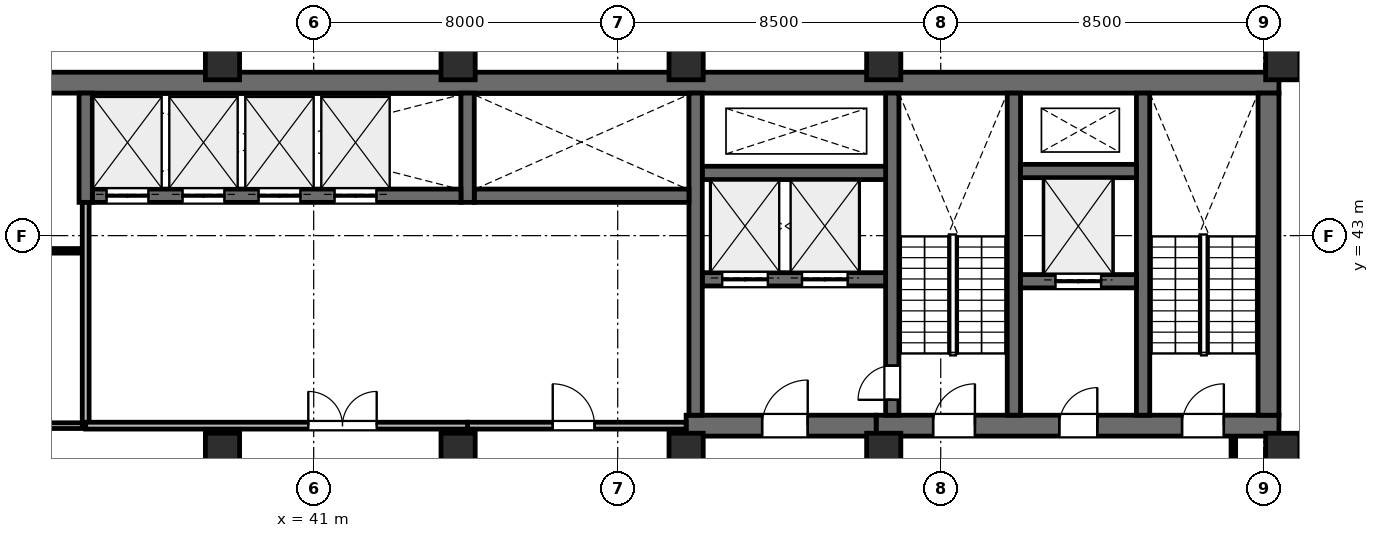
"""IFC4 building model, lengths in metres.
Left out: names, types, materials, properties, quantities, classifications, styles, units other than length and angle.
Written with IfcOpenShell. Run it as: python <this file> out.ifc"""

import sys

from ifc_helpers import new_model, si_unit, direction, frame, frame_2d, origin, origin_2d, place, context, subcontext, project, spatial, rectangle, extrude, element, fill, save


model = new_model("IFC4")
c1 = context("Model", 3, precision=1e-05, world=origin(), true_north=direction((0.0, 1.0)))
c2 = subcontext(c1, "Body", "Model", "MODEL_VIEW")
j1 = project(units=[si_unit("LENGTHUNIT", "METRE"), si_unit("PLANEANGLEUNIT", "RADIAN")], contexts=[c1])
p1 = place(None, origin())
s1 = spatial("IfcSite", under=j1, at=p1, CompositionType="ELEMENT")
p2 = place(p1, origin())
s2 = spatial("IfcBuilding", under=s1, at=p2, CompositionType="ELEMENT")
p3 = place(p2, frame((0.0, 0.0, 168.5)))
s3 = spatial("IfcBuildingStorey", under=s2, at=p3, CompositionType="ELEMENT", Elevation=168.5)
p4 = place(p3, frame((22.9, 47.025, 0.0), z_axis=(0.0, 0.0, 1.0), x_axis=(1.0, 0.0, 0.0)))
e1 = element("IfcWall", 1, at=p4, inside=s3, PredefinedType="SHEAR", context=c2, shape_type="SweptSolid", body=[
    extrude(rectangle(XDim=43.5, YDim=0.55, at=frame_2d((21.75, 0.0))), origin(), (0.0, 0.0, 1.0), 4.0),
])
p5 = place(p3, frame((55.8, 38.0, 0.0), z_axis=(0.0, 0.0, 1.0), x_axis=(1.0, 0.0, 0.0)))
e2 = element("IfcWall", 2, at=p5, inside=s3, PredefinedType="SHEAR", context=c2, shape_type="SweptSolid", body=[
    extrude(rectangle(XDim=10.6, YDim=0.55, at=frame_2d((5.3, 0.0))), origin(), (0.0, 0.0, 1.0), 4.0),
])
p6 = place(p5, frame((1.5, 0.0, 0.0)))
e3 = element("IfcOpeningElement", 3, at=p6, cuts=e2, PredefinedType="OPENING", context=c2, shape_type="SweptSolid", body=[
    extrude(rectangle(XDim=1.1, YDim=2.2, at=frame_2d((0.55, 1.1))), frame((0.0, 0.285, 0.0), z_axis=(0.0, -1.0, 0.0), x_axis=(1.0, 0.0, 0.0)), (0.0, 0.0, 1.0), 0.57),
])
p7 = place(p5, frame((4.82, 0.0, 0.0)))
e4 = element("IfcOpeningElement", 4, at=p7, cuts=e2, PredefinedType="OPENING", context=c2, shape_type="SweptSolid", body=[
    extrude(rectangle(XDim=1.0, YDim=2.15, at=frame_2d((0.5, 1.075))), frame((0.0, 0.285, 0.0), z_axis=(0.0, -1.0, 0.0), x_axis=(1.0, 0.0, 0.0)), (0.0, 0.0, 1.0), 0.57),
])
p8 = place(p5, frame((8.05, 0.0, 0.0)))
e5 = element("IfcOpeningElement", 5, at=p8, cuts=e2, PredefinedType="OPENING", context=c2, shape_type="SweptSolid", body=[
    extrude(rectangle(XDim=1.1, YDim=2.2, at=frame_2d((0.55, 1.1))), frame((0.0, 0.285, 0.0), z_axis=(0.0, -1.0, 0.0), x_axis=(1.0, 0.0, 0.0)), (0.0, 0.0, 1.0), 0.57),
])
p9 = place(p3, frame((66.125, 38.275, 0.0), z_axis=(0.0, 0.0, 1.0), x_axis=(0.0, 1.0, 0.0)))
e6 = element("IfcWall", 6, at=p9, inside=s3, PredefinedType="SHEAR", context=c2, shape_type="SweptSolid", body=[
    extrude(rectangle(XDim=8.475, YDim=0.55, at=frame_2d((4.238, 0.0))), origin(), (0.0, 0.0, 1.0), 4.0),
])
for number, where, z_axis, x_axis in (
    (7, (62.825, 38.275, 0.0), (0.0, 0.0, 1.0), (0.0, 1.0, 0.0)),
    (8, (59.425, 38.275, 0.0), (0.0, 0.0, 1.0), (0.0, 1.0, 0.0)),
):
    element("IfcWall", number, at=place(p3, frame(where, z_axis=z_axis, x_axis=x_axis)), inside=s3, PredefinedType="SHEAR", context=c2, shape_type="SweptSolid", body=[
        extrude(rectangle(XDim=8.475, YDim=0.35, at=frame_2d((4.238, 0.0))), origin(), (0.0, 0.0, 1.0), 4.0),
    ])
p10 = place(p3, frame((56.225, 38.275, 0.0), z_axis=(0.0, 0.0, 1.0), x_axis=(0.0, 1.0, 0.0)))
e9 = element("IfcWall", 9, at=p10, inside=s3, PredefinedType="SHEAR", context=c2, shape_type="SweptSolid", body=[
    extrude(rectangle(XDim=8.475, YDim=0.35, at=frame_2d((4.238, 0.0))), origin(), (0.0, 0.0, 1.0), 4.0),
])
p11 = place(p10, frame((0.405, 0.0, 0.0)))
e10 = element("IfcOpeningElement", 10, at=p11, cuts=e9, PredefinedType="OPENING", context=c2, shape_type="SweptSolid", body=[
    extrude(rectangle(XDim=0.9, YDim=2.15, at=frame_2d((0.45, 1.075))), frame((0.0, 0.185, 0.0), z_axis=(0.0, -1.0, 0.0), x_axis=(1.0, 0.0, 0.0)), (0.0, 0.0, 1.0), 0.37),
])
p12 = place(p3, frame((59.6, 41.8, 0.0), z_axis=(0.0, 0.0, 1.0), x_axis=(1.0, 0.0, 0.0)))
e11 = element("IfcWall", 11, at=p12, inside=s3, PredefinedType="SHEAR", context=c2, shape_type="SweptSolid", body=[
    extrude(rectangle(XDim=3.05, YDim=0.35, at=frame_2d((1.525, 0.0))), origin(), (0.0, 0.0, 1.0), 4.0),
])
p13 = place(p12, frame((0.92, 0.0, 0.0)))
e12 = element("IfcOpeningElement", 12, at=p13, cuts=e11, PredefinedType="OPENING", context=c2, shape_type="SweptSolid", body=[
    extrude(rectangle(XDim=1.2, YDim=2.2, at=frame_2d((0.6, 1.1))), frame((0.0, 0.185, 0.0), z_axis=(0.0, -1.0, 0.0), x_axis=(1.0, 0.0, 0.0)), (0.0, 0.0, 1.0), 0.37),
])
p14 = place(p3, frame((59.6, 44.7, 0.0), z_axis=(0.0, 0.0, 1.0), x_axis=(1.0, 0.0, 0.0)))
e13 = element("IfcWall", 13, at=p14, inside=s3, PredefinedType="SHEAR", context=c2, shape_type="SweptSolid", body=[
    extrude(rectangle(XDim=3.05, YDim=0.35, at=frame_2d((1.525, 0.0))), origin(), (0.0, 0.0, 1.0), 4.0),
])
p15 = place(p3, frame((50.8, 38.0, 0.0), z_axis=(0.0, 0.0, 1.0), x_axis=(1.0, 0.0, 0.0)))
e14 = element("IfcWall", 14, at=p15, inside=s3, PredefinedType="SHEAR", context=c2, shape_type="SweptSolid", body=[
    extrude(rectangle(XDim=5.0, YDim=0.55, at=frame_2d((2.5, 0.0))), origin(), (0.0, 0.0, 1.0), 4.0),
])
p16 = place(p15, frame((2.0, 0.0, 0.0)))
e15 = element("IfcOpeningElement", 15, at=p16, cuts=e14, PredefinedType="OPENING", context=c2, shape_type="SweptSolid", body=[
    extrude(rectangle(XDim=1.2, YDim=2.2, at=frame_2d((0.6, 1.1))), frame((0.0, 0.285, 0.0), z_axis=(0.0, -1.0, 0.0), x_axis=(1.0, 0.0, 0.0)), (0.0, 0.0, 1.0), 0.57),
])
p17 = place(p3, frame((51.225, 41.85, 0.0), z_axis=(0.0, 0.0, 1.0), x_axis=(1.0, 0.0, 0.0)))
e16 = element("IfcWall", 16, at=p17, inside=s3, PredefinedType="SHEAR", context=c2, shape_type="SweptSolid", body=[
    extrude(rectangle(XDim=4.825, YDim=0.35, at=frame_2d((2.413, 0.0))), origin(), (0.0, 0.0, 1.0), 4.0),
])
p18 = place(p17, frame((0.525, 0.0, 0.0)))
e17 = element("IfcOpeningElement", 17, at=p18, cuts=e16, PredefinedType="OPENING", context=c2, shape_type="SweptSolid", body=[
    extrude(rectangle(XDim=1.2, YDim=2.2, at=frame_2d((0.6, 1.1))), frame((0.0, 0.185, 0.0), z_axis=(0.0, -1.0, 0.0), x_axis=(1.0, 0.0, 0.0)), (0.0, 0.0, 1.0), 0.37),
])
p19 = place(p17, frame((2.625, 0.0, 0.0)))
e18 = element("IfcOpeningElement", 18, at=p19, cuts=e16, PredefinedType="OPENING", context=c2, shape_type="SweptSolid", body=[
    extrude(rectangle(XDim=1.2, YDim=2.2, at=frame_2d((0.6, 1.1))), frame((0.0, 0.185, 0.0), z_axis=(0.0, -1.0, 0.0), x_axis=(1.0, 0.0, 0.0)), (0.0, 0.0, 1.0), 0.37),
])
p20 = place(p3, frame((51.225, 44.65, 0.0), z_axis=(0.0, 0.0, 1.0), x_axis=(1.0, 0.0, 0.0)))
e19 = element("IfcWall", 19, at=p20, inside=s3, PredefinedType="SHEAR", context=c2, shape_type="SweptSolid", body=[
    extrude(rectangle(XDim=4.825, YDim=0.35, at=frame_2d((2.413, 0.0))), origin(), (0.0, 0.0, 1.0), 4.0),
])
p21 = place(p3, frame((51.05, 38.275, 0.0), z_axis=(0.0, 0.0, 1.0), x_axis=(0.0, 1.0, 0.0)))
e20 = element("IfcWall", 20, at=p21, inside=s3, PredefinedType="SHEAR", context=c2, shape_type="SweptSolid", body=[
    extrude(rectangle(XDim=8.475, YDim=0.35, at=frame_2d((4.238, 0.0))), origin(), (0.0, 0.0, 1.0), 4.0),
])
p22 = place(p3, frame((45.225, 44.05, 0.0), z_axis=(0.0, 0.0, 1.0), x_axis=(1.0, 0.0, 0.0)))
e21 = element("IfcWall", 21, at=p22, inside=s3, PredefinedType="SHEAR", context=c2, shape_type="SweptSolid", body=[
    extrude(rectangle(XDim=5.65, YDim=0.35, at=frame_2d((2.825, 0.0))), origin(), (0.0, 0.0, 1.0), 4.0),
])
p23 = place(p3, frame((45.05, 43.875, 0.0), z_axis=(0.0, 0.0, 1.0), x_axis=(0.0, 1.0, 0.0)))
e22 = element("IfcWall", 22, at=p23, inside=s3, PredefinedType="SHEAR", context=c2, shape_type="SweptSolid", body=[
    extrude(rectangle(XDim=2.875, YDim=0.35, at=frame_2d((1.438, 0.0))), origin(), (0.0, 0.0, 1.0), 4.0),
])
p24 = place(p3, frame((35.175, 44.05, 0.0), z_axis=(0.0, 0.0, 1.0), x_axis=(1.0, 0.0, 0.0)))
e23 = element("IfcWall", 23, at=p24, inside=s3, PredefinedType="SHEAR", context=c2, shape_type="SweptSolid", body=[
    extrude(rectangle(XDim=9.7, YDim=0.35, at=frame_2d((4.85, 0.0))), origin(), (0.0, 0.0, 1.0), 4.0),
])
p25 = place(p24, frame((0.375, 0.0, 0.0)))
e24 = element("IfcOpeningElement", 24, at=p25, cuts=e23, PredefinedType="OPENING", context=c2, shape_type="SweptSolid", body=[
    extrude(rectangle(XDim=1.1, YDim=2.2, at=frame_2d((0.55, 1.1))), frame((0.0, 0.185, 0.0), z_axis=(0.0, -1.0, 0.0), x_axis=(1.0, 0.0, 0.0)), (0.0, 0.0, 1.0), 0.37),
])
p26 = place(p24, frame((2.375, 0.0, 0.0)))
e25 = element("IfcOpeningElement", 25, at=p26, cuts=e23, PredefinedType="OPENING", context=c2, shape_type="SweptSolid", body=[
    extrude(rectangle(XDim=1.1, YDim=2.2, at=frame_2d((0.55, 1.1))), frame((0.0, 0.185, 0.0), z_axis=(0.0, -1.0, 0.0), x_axis=(1.0, 0.0, 0.0)), (0.0, 0.0, 1.0), 0.37),
])
p27 = place(p24, frame((4.375, 0.0, 0.0)))
e26 = element("IfcOpeningElement", 26, at=p27, cuts=e23, PredefinedType="OPENING", context=c2, shape_type="SweptSolid", body=[
    extrude(rectangle(XDim=1.1, YDim=2.2, at=frame_2d((0.55, 1.1))), frame((0.0, 0.185, 0.0), z_axis=(0.0, -1.0, 0.0), x_axis=(1.0, 0.0, 0.0)), (0.0, 0.0, 1.0), 0.37),
])
p28 = place(p24, frame((6.375, 0.0, 0.0)))
e27 = element("IfcOpeningElement", 27, at=p28, cuts=e23, PredefinedType="OPENING", context=c2, shape_type="SweptSolid", body=[
    extrude(rectangle(XDim=1.1, YDim=2.2, at=frame_2d((0.55, 1.1))), frame((0.0, 0.185, 0.0), z_axis=(0.0, -1.0, 0.0), x_axis=(1.0, 0.0, 0.0)), (0.0, 0.0, 1.0), 0.37),
])
p29 = place(p3, frame((35.0, 43.875, 0.0), z_axis=(0.0, 0.0, 1.0), x_axis=(0.0, 1.0, 0.0)))
e28 = element("IfcWall", 28, at=p29, inside=s3, PredefinedType="SHEAR", context=c2, shape_type="SweptSolid", body=[
    extrude(rectangle(XDim=2.875, YDim=0.35, at=frame_2d((1.438, 0.0))), origin(), (0.0, 0.0, 1.0), 4.0),
])
for number, where, z_axis, x_axis in (
    (29, (66.5, 47.55, 0.0), (0.0, 0.0, 1.0), (1.0, 0.0, 0.0)),
    (30, (56.0, 47.55, 0.0), (0.0, 0.0, 1.0), (1.0, 0.0, 0.0)),
    (31, (66.5, 37.35, 0.0), (0.0, 0.0, 1.0), (1.0, 0.0, 0.0)),
    (32, (56.0, 37.35, 0.0), (0.0, 0.0, 1.0), (1.0, 0.0, 0.0)),
    (33, (50.8, 47.55, 0.0), (0.0, 0.0, 1.0), (1.0, 0.0, 0.0)),
    (34, (50.8, 37.35, 0.0), (0.0, 0.0, 1.0), (1.0, 0.0, 0.0)),
    (35, (44.8, 37.35, 0.0), (0.0, 0.0, 1.0), (1.0, 0.0, 0.0)),
    (36, (44.8, 47.55, 0.0), (0.0, 0.0, 1.0), (1.0, 0.0, 0.0)),
    (37, (38.6, 37.35, 0.0), (0.0, 0.0, 1.0), (1.0, 0.0, 0.0)),
    (38, (38.6, 47.55, 0.0), (0.0, 0.0, 1.0), (1.0, 0.0, 0.0)),
):
    element("IfcColumn", number, at=place(p3, frame(where, z_axis=z_axis, x_axis=x_axis)), inside=s3, PredefinedType="COLUMN", context=c2, shape_type="SweptSolid", body=[
        extrude(rectangle(XDim=0.9, YDim=0.9, at=origin_2d()), origin(), (0.0, 0.0, 1.0), 4.0),
    ])
p30 = place(p3, frame((68.375, 37.8, 0.0), z_axis=(0.0, 0.0, 1.0), x_axis=(-0.139173290738, -0.99026804207, 0.0)))
e39 = element("IfcWall", 39, at=p30, inside=s3, PredefinedType="STANDARD", context=c2, shape_type="SweptSolid", body=[
    extrude(rectangle(XDim=24.498, YDim=0.28, at=frame_2d((12.249, 0.0))), origin(), (0.0, 0.0, 1.0), 3.755),
])
p31 = place(p30, frame((8.44, 0.0, 0.0)))
e40 = element("IfcOpeningElement", 40, at=p31, cuts=e39, PredefinedType="OPENING", context=c2, shape_type="SweptSolid", body=[
    extrude(rectangle(XDim=1.0, YDim=2.15, at=frame_2d((0.5, 1.075))), frame((0.0, 0.15, 0.0), z_axis=(0.0, -1.0, 0.0), x_axis=(1.0, 0.0, 0.0)), (0.0, 0.0, 1.0), 0.3),
])
p32 = place(p30, frame((3.99, 0.0, 0.65)))
e41 = element("IfcOpeningElement", 41, at=p32, cuts=e39, PredefinedType="OPENING", context=c2, shape_type="SweptSolid", body=[
    extrude(rectangle(XDim=1.8, YDim=2.1, at=frame_2d((0.9, 1.05))), frame((0.0, 0.15, 0.0), z_axis=(0.0, -1.0, 0.0), x_axis=(1.0, 0.0, 0.0)), (0.0, 0.0, 1.0), 0.3),
])
p33 = place(p30, frame((14.606, 0.0, 0.65)))
e42 = element("IfcOpeningElement", 42, at=p33, cuts=e39, PredefinedType="OPENING", context=c2, shape_type="SweptSolid", body=[
    extrude(rectangle(XDim=1.8, YDim=2.1, at=frame_2d((0.9, 1.05))), frame((0.0, 0.15, 0.0), z_axis=(0.0, -1.0, 0.0), x_axis=(1.0, 0.0, 0.0)), (0.0, 0.0, 1.0), 0.3),
])
p34 = place(p3, frame((45.05, 38.0, 0.0), z_axis=(0.0, 0.0, 1.0), x_axis=(1.0, 0.0, 0.0)))
e43 = element("IfcWall", 43, at=p34, inside=s3, PredefinedType="STANDARD", context=c2, shape_type="SweptSolid", body=[
    extrude(rectangle(XDim=5.75, YDim=0.18, at=frame_2d((2.875, 0.0))), origin(), (0.0, 0.0, 1.0), 2.982),
])
p35 = place(p34, frame((2.24, 0.0, 0.0)))
e44 = element("IfcOpeningElement", 44, at=p35, cuts=e43, PredefinedType="OPENING", context=c2, shape_type="SweptSolid", body=[
    extrude(rectangle(XDim=1.1, YDim=2.2, at=frame_2d((0.55, 1.1))), frame((0.0, 0.1, 0.0), z_axis=(0.0, -1.0, 0.0), x_axis=(1.0, 0.0, 0.0)), (0.0, 0.0, 1.0), 0.2),
])
p36 = place(p3, frame((27.05, 38.0, 0.0), z_axis=(0.0, 0.0, 1.0), x_axis=(1.0, 0.0, 0.0)))
e45 = element("IfcWall", 45, at=p36, inside=s3, PredefinedType="PARTITIONING", context=c2, shape_type="SweptSolid", body=[
    extrude(rectangle(XDim=7.95, YDim=0.15, at=frame_2d((3.975, 0.0))), origin(), (0.0, 0.0, 1.0), 2.982),
])
p37 = place(p36, frame((1.985, 0.0, 0.0)))
e46 = element("IfcOpeningElement", 46, at=p37, cuts=e45, PredefinedType="OPENING", context=c2, shape_type="SweptSolid", body=[
    extrude(rectangle(XDim=1.05, YDim=2.2, at=frame_2d((0.525, 1.1))), frame((0.0, 0.085, 0.0), z_axis=(0.0, -1.0, 0.0), x_axis=(1.0, 0.0, 0.0)), (0.0, 0.0, 1.0), 0.17),
])
p38 = place(p3, frame((35.0, 38.0, 0.0), z_axis=(0.0, 0.0, 1.0), x_axis=(0.0, 1.0, 0.0)))
e47 = element("IfcWall", 47, at=p38, inside=s3, PredefinedType="STANDARD", context=c2, shape_type="SweptSolid", body=[
    extrude(rectangle(XDim=5.875, YDim=0.18, at=frame_2d((2.938, 0.0))), origin(), (0.0, 0.0, 1.0), 3.755),
])
p39 = place(p3, frame((30.868, 42.6, 0.0), z_axis=(0.0, 0.0, 1.0), x_axis=(1.0, 0.0, 0.0)))
e48 = element("IfcWall", 48, at=p39, inside=s3, PredefinedType="PARTITIONING", context=c2, shape_type="SweptSolid", body=[
    extrude(rectangle(XDim=4.014, YDim=0.12, at=frame_2d((2.007, 0.0))), origin(), (0.0, 0.0, 1.0), 2.982),
])
p40 = place(p39, frame((1.622, 0.0, 0.0)))
e49 = element("IfcOpeningElement", 49, at=p40, cuts=e48, PredefinedType="OPENING", context=c2, shape_type="SweptSolid", body=[
    extrude(rectangle(XDim=0.85, YDim=2.1, at=frame_2d((0.425, 1.05))), frame((0.0, 0.07, 0.0), z_axis=(0.0, -1.0, 0.0), x_axis=(1.0, 0.0, 0.0)), (0.0, 0.0, 1.0), 0.14),
])
p41 = place(p3, frame((35.0, 38.0, 0.0), z_axis=(0.0, 0.0, 1.0), x_axis=(1.0, 0.0, 0.0)))
e50 = element("IfcWall", 50, at=p41, inside=s3, PredefinedType="STANDARD", context=c2, shape_type="SweptSolid", body=[
    extrude(rectangle(XDim=10.05, YDim=0.18, at=frame_2d((5.025, 0.0))), origin(), (0.0, 0.0, 1.0), 2.982),
])
p42 = place(p41, frame((5.858, 0.0, 0.0)))
e51 = element("IfcOpeningElement", 51, at=p42, cuts=e50, PredefinedType="OPENING", context=c2, shape_type="SweptSolid", body=[
    extrude(rectangle(XDim=1.8, YDim=2.2, at=frame_2d((0.9, 1.1))), frame((0.0, 0.1, 0.0), z_axis=(0.0, -1.0, 0.0), x_axis=(1.0, 0.0, 0.0)), (0.0, 0.0, 1.0), 0.2),
])
p43 = place(p3, frame((65.2, 34.4, 0.0), z_axis=(0.0, 0.0, 1.0), x_axis=(0.0, 1.0, 0.0)))
e52 = element("IfcWall", 52, at=p43, inside=s3, PredefinedType="PARTITIONING", context=c2, shape_type="SweptSolid", body=[
    extrude(rectangle(XDim=3.317, YDim=0.12, at=frame_2d((1.659, 0.0))), origin(), (0.0, 0.0, 1.0), 2.982),
])
p44 = place(p6, origin())
e53 = element("IfcDoor", 53, at=p44, inside=s3, OperationType="SINGLE_SWING_RIGHT", PredefinedType="DOOR", context=c2, shape_type="SweptSolid", body=[
    extrude(rectangle(XDim=1.1, YDim=2.2, at=frame_2d((0.55, 1.1))), frame((0.0, 0.025, 0.0), z_axis=(0.0, -1.0, 0.0), x_axis=(1.0, 0.0, 0.0)), (0.0, 0.0, 1.0), 0.05),
])
fill(e3, e53)
p45 = place(p7, origin())
e54 = element("IfcDoor", 54, at=p45, inside=s3, OperationType="SINGLE_SWING_RIGHT", PredefinedType="DOOR", context=c2, shape_type="SweptSolid", body=[
    extrude(rectangle(XDim=1.0, YDim=2.15, at=frame_2d((0.5, 1.075))), frame((0.0, 0.025, 0.0), z_axis=(0.0, -1.0, 0.0), x_axis=(1.0, 0.0, 0.0)), (0.0, 0.0, 1.0), 0.05),
])
fill(e4, e54)
p46 = place(p8, origin())
e55 = element("IfcDoor", 55, at=p46, inside=s3, OperationType="SINGLE_SWING_RIGHT", PredefinedType="DOOR", context=c2, shape_type="SweptSolid", body=[
    extrude(rectangle(XDim=1.1, YDim=2.2, at=frame_2d((0.55, 1.1))), frame((0.0, 0.025, 0.0), z_axis=(0.0, -1.0, 0.0), x_axis=(1.0, 0.0, 0.0)), (0.0, 0.0, 1.0), 0.05),
])
fill(e5, e55)
p47 = place(p16, origin())
e56 = element("IfcDoor", 56, at=p47, inside=s3, OperationType="SINGLE_SWING_RIGHT", PredefinedType="DOOR", context=c2, shape_type="SweptSolid", body=[
    extrude(rectangle(XDim=1.2, YDim=2.2, at=frame_2d((0.6, 1.1))), frame((0.0, 0.025, 0.0), z_axis=(0.0, -1.0, 0.0), x_axis=(1.0, 0.0, 0.0)), (0.0, 0.0, 1.0), 0.05),
])
fill(e15, e56)
p48 = place(p11, origin())
e57 = element("IfcDoor", 57, at=p48, inside=s3, OperationType="SINGLE_SWING_LEFT", PredefinedType="DOOR", context=c2, shape_type="SweptSolid", body=[
    extrude(rectangle(XDim=0.9, YDim=2.15, at=frame_2d((0.45, 1.075))), frame((0.0, 0.025, 0.0), z_axis=(0.0, -1.0, 0.0), x_axis=(1.0, 0.0, 0.0)), (0.0, 0.0, 1.0), 0.05),
])
fill(e10, e57)
p49 = place(p25, origin())
e58 = element("IfcDoor", 58, at=p49, inside=s3, OperationType="DOUBLE_DOOR_SLIDING", PredefinedType="DOOR", context=c2, shape_type="SweptSolid", body=[
    extrude(rectangle(XDim=1.1, YDim=2.2, at=frame_2d((0.55, 1.1))), frame((0.0, 0.025, 0.0), z_axis=(0.0, -1.0, 0.0), x_axis=(1.0, 0.0, 0.0)), (0.0, 0.0, 1.0), 0.05),
])
fill(e24, e58)
p50 = place(p26, origin())
e59 = element("IfcDoor", 59, at=p50, inside=s3, OperationType="DOUBLE_DOOR_SLIDING", PredefinedType="DOOR", context=c2, shape_type="SweptSolid", body=[
    extrude(rectangle(XDim=1.1, YDim=2.2, at=frame_2d((0.55, 1.1))), frame((0.0, 0.025, 0.0), z_axis=(0.0, -1.0, 0.0), x_axis=(1.0, 0.0, 0.0)), (0.0, 0.0, 1.0), 0.05),
])
fill(e25, e59)
p51 = place(p27, origin())
e60 = element("IfcDoor", 60, at=p51, inside=s3, OperationType="DOUBLE_DOOR_SLIDING", PredefinedType="DOOR", context=c2, shape_type="SweptSolid", body=[
    extrude(rectangle(XDim=1.1, YDim=2.2, at=frame_2d((0.55, 1.1))), frame((0.0, 0.025, 0.0), z_axis=(0.0, -1.0, 0.0), x_axis=(1.0, 0.0, 0.0)), (0.0, 0.0, 1.0), 0.05),
])
fill(e26, e60)
p52 = place(p28, origin())
e61 = element("IfcDoor", 61, at=p52, inside=s3, OperationType="DOUBLE_DOOR_SLIDING", PredefinedType="DOOR", context=c2, shape_type="SweptSolid", body=[
    extrude(rectangle(XDim=1.1, YDim=2.2, at=frame_2d((0.55, 1.1))), frame((0.0, 0.025, 0.0), z_axis=(0.0, -1.0, 0.0), x_axis=(1.0, 0.0, 0.0)), (0.0, 0.0, 1.0), 0.05),
])
fill(e27, e61)
p53 = place(p18, origin())
e62 = element("IfcDoor", 62, at=p53, inside=s3, OperationType="DOUBLE_DOOR_SLIDING", PredefinedType="DOOR", context=c2, shape_type="SweptSolid", body=[
    extrude(rectangle(XDim=1.2, YDim=2.2, at=frame_2d((0.6, 1.1))), frame((0.0, 0.025, 0.0), z_axis=(0.0, -1.0, 0.0), x_axis=(1.0, 0.0, 0.0)), (0.0, 0.0, 1.0), 0.05),
])
fill(e17, e62)
p54 = place(p19, origin())
e63 = element("IfcDoor", 63, at=p54, inside=s3, OperationType="DOUBLE_DOOR_SLIDING", PredefinedType="DOOR", context=c2, shape_type="SweptSolid", body=[
    extrude(rectangle(XDim=1.2, YDim=2.2, at=frame_2d((0.6, 1.1))), frame((0.0, 0.025, 0.0), z_axis=(0.0, -1.0, 0.0), x_axis=(1.0, 0.0, 0.0)), (0.0, 0.0, 1.0), 0.05),
])
fill(e18, e63)
p55 = place(p13, origin())
e64 = element("IfcDoor", 64, at=p55, inside=s3, OperationType="DOUBLE_DOOR_SLIDING", PredefinedType="DOOR", context=c2, shape_type="SweptSolid", body=[
    extrude(rectangle(XDim=1.2, YDim=2.2, at=frame_2d((0.6, 1.1))), frame((0.0, 0.025, 0.0), z_axis=(0.0, -1.0, 0.0), x_axis=(1.0, 0.0, 0.0)), (0.0, 0.0, 1.0), 0.05),
])
fill(e12, e64)
p56 = place(p35, origin())
e65 = element("IfcDoor", 65, at=p56, inside=s3, OperationType="SINGLE_SWING_LEFT", PredefinedType="DOOR", context=c2, shape_type="SweptSolid", body=[
    extrude(rectangle(XDim=1.1, YDim=2.2, at=frame_2d((0.55, 1.1))), frame((0.0, 0.025, 0.0), z_axis=(0.0, -1.0, 0.0), x_axis=(1.0, 0.0, 0.0)), (0.0, 0.0, 1.0), 0.05),
])
fill(e44, e65)
p57 = place(p42, origin())
e66 = element("IfcDoor", 66, at=p57, inside=s3, OperationType="DOUBLE_DOOR_SINGLE_SWING", PredefinedType="DOOR", context=c2, shape_type="SweptSolid", body=[
    extrude(rectangle(XDim=1.8, YDim=2.2, at=frame_2d((0.9, 1.1))), frame((0.0, 0.025, 0.0), z_axis=(0.0, -1.0, 0.0), x_axis=(1.0, 0.0, 0.0)), (0.0, 0.0, 1.0), 0.05),
])
fill(e51, e66)
save(model, sys.argv[1])
